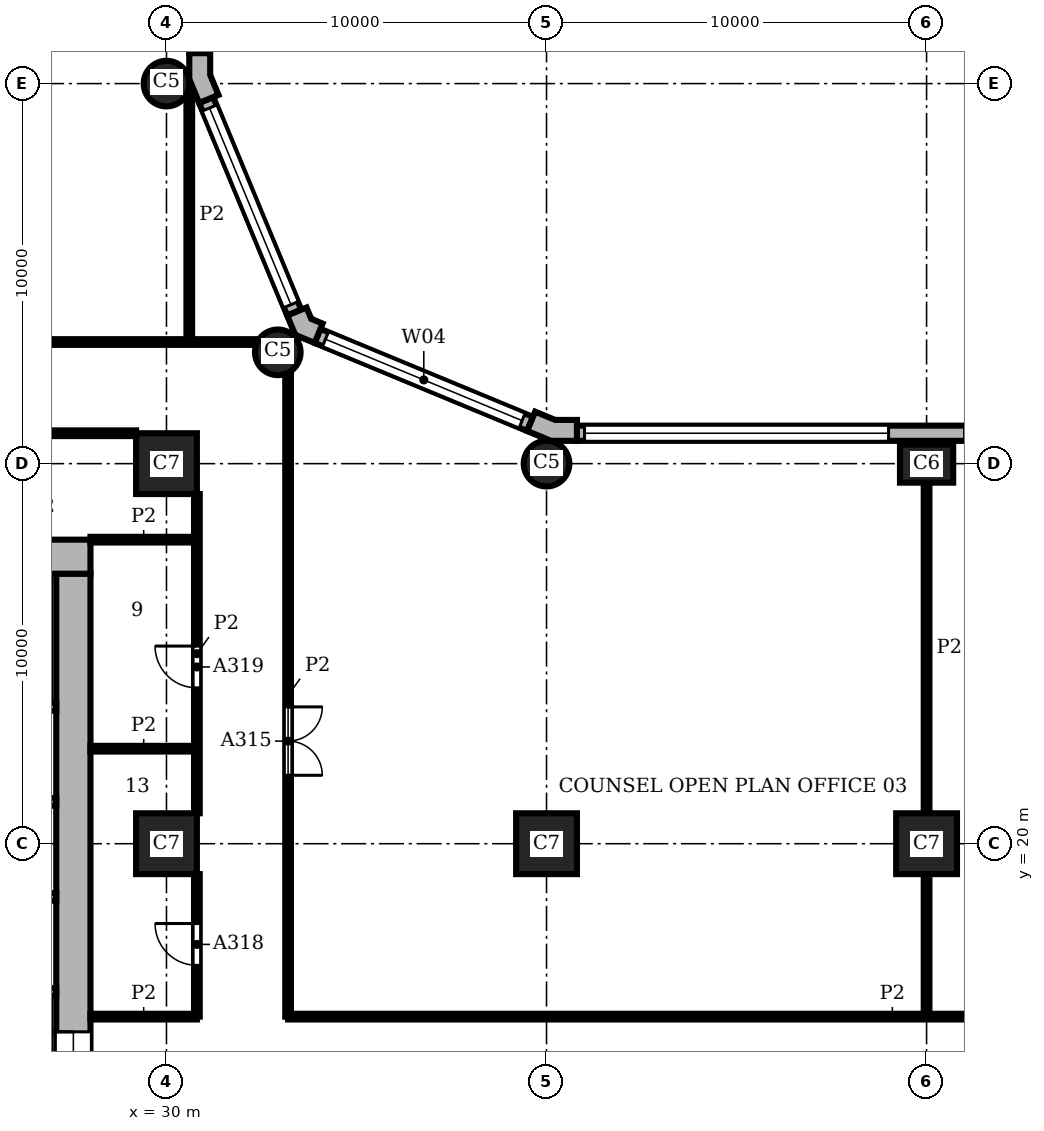
"""IFC4 building model, lengths in metres.
Left out: names, types, materials, properties, quantities, classifications, styles, units other than length and angle.
Written with IfcOpenShell. Run it as: python <this file> out.ifc"""

import sys

from ifc_helpers import new_model, si_unit, direction, frame, frame_2d, origin, origin_2d, place, context, subcontext, project, spatial, polyline, rectangle, circle, outline, extrude, element, fill, save


model = new_model("IFC4")
c1 = context("Model", 3, precision=1e-05, world=origin(), true_north=direction((0.0, 1.0)))
c2 = subcontext(c1, "Body", "Model", "MODEL_VIEW")
j1 = project(units=[si_unit("LENGTHUNIT", "METRE"), si_unit("PLANEANGLEUNIT", "RADIAN")], contexts=[c1])
p1 = place(None, origin())
s1 = spatial("IfcSite", under=j1, at=p1, CompositionType="ELEMENT")
p2 = place(p1, origin())
s2 = spatial("IfcBuilding", under=s1, at=p2, CompositionType="ELEMENT")
p3 = place(p2, frame((0.0, 0.0, 43.2)))
s3 = spatial("IfcBuildingStorey", under=s2, at=p3, CompositionType="ELEMENT", Elevation=43.2)
p4 = place(p3, frame((50.0, 30.0, 0.0), z_axis=(0.0, 0.0, 1.0), x_axis=(1.0, 0.0, 0.0)))
e1 = element("IfcColumn", 1, at=p4, inside=s3, PredefinedType="COLUMN", context=c2, shape_type="SweptSolid", body=[
    extrude(rectangle(XDim=1.4, YDim=1.0, at=origin_2d()), origin(), (0.0, 0.0, 1.0), 3.9),
])
for number, where, z_axis, x_axis in (
    (2, (40.0, 30.0, 0.0), (0.0, 0.0, 1.0), (1.0, 0.0, 0.0)),
    (3, (32.929, 32.929, 0.0), (0.0, 0.0, 1.0), (1.0, 0.0, 0.0)),
    (4, (30.0, 40.0, 0.0), (0.0, 0.0, 1.0), (1.0, 0.0, 0.0)),
):
    element("IfcColumn", number, at=place(p3, frame(where, z_axis=z_axis, x_axis=x_axis)), inside=s3, PredefinedType="COLUMN", context=c2, shape_type="SweptSolid", body=[
        extrude(circle(Radius=0.6, at=origin_2d()), origin(), (0.0, 0.0, 1.0), 3.9),
    ])
for number, where, z_axis, x_axis in (
    (5, (30.0, 20.0, 0.0), (0.0, 0.0, 1.0), (1.0, 0.0, 0.0)),
    (6, (30.0, 30.0, 0.0), (0.0, 0.0, 1.0), (1.0, 0.0, 0.0)),
    (7, (40.0, 20.0, 0.0), (0.0, 0.0, 1.0), (1.0, 0.0, 0.0)),
    (8, (50.0, 20.0, 0.0), (0.0, 0.0, 1.0), (1.0, 0.0, 0.0)),
):
    element("IfcColumn", number, at=place(p3, frame(where, z_axis=z_axis, x_axis=x_axis)), inside=s3, PredefinedType="COLUMN", context=c2, shape_type="SweptSolid", body=[
        extrude(rectangle(XDim=1.6, YDim=1.6, at=origin_2d()), origin(), (0.0, 0.0, 1.0), 3.9),
    ])
p5 = place(p3, frame((27.55, 8.9, 0.0), z_axis=(0.0, 0.0, 1.0), x_axis=(0.0, 1.0, 0.0)))
e9 = element("IfcWall", 9, at=p5, inside=s3, PredefinedType="SHEAR", context=c2, shape_type="SweptSolid", body=[
    extrude(rectangle(XDim=18.2, YDim=0.9, at=frame_2d((9.1, 0.0))), origin(), (0.0, 0.0, 1.0), 3.9),
])
p6 = place(p5, frame((4.55, 0.0, 0.0)))
e10 = element("IfcOpeningElement", 10, at=p6, cuts=e9, PredefinedType="OPENING", context=c2, shape_type="SweptSolid", body=[
    extrude(rectangle(XDim=1.6, YDim=2.1, at=frame_2d((0.8, 1.05))), frame((0.0, 0.46, 0.0), z_axis=(0.0, -1.0, 0.0), x_axis=(1.0, 0.0, 0.0)), (0.0, 0.0, 1.0), 0.92),
])
p7 = place(p3, frame((28.0, 27.55, 0.0), z_axis=(0.0, 0.0, 1.0), x_axis=(-1.0, 0.0, 0.0)))
e11 = element("IfcWall", 11, at=p7, inside=s3, PredefinedType="SHEAR", context=c2, shape_type="SweptSolid", body=[
    extrude(rectangle(XDim=20.0, YDim=0.9, at=frame_2d((10.0, 0.0))), origin(), (0.0, 0.0, 1.0), 3.9),
])
p8 = place(p3, origin())
e12 = element("IfcWall", 12, at=p8, inside=s3, PredefinedType="SOLIDWALL", context=c2, shape_type="SweptSolid", body=[
    extrude(outline(polyline([(40.8, 31.0), (40.8, 31.15), (40.229, 31.15), (39.701, 31.369), (39.644, 31.23), (39.49, 30.861), (40.119, 30.6), (40.8, 30.6), (40.8, 31.0)])), origin(), (0.0, 0.0, 1.0), 3.9),
])
e13 = element("IfcWall", 13, at=p8, inside=s3, PredefinedType="SOLIDWALL", context=c2, shape_type="SweptSolid", body=[
    extrude(outline(polyline([(34.051, 33.547), (34.108, 33.685), (33.809, 33.809), (33.685, 34.108), (33.547, 34.051), (33.177, 33.898), (33.388, 33.388), (33.898, 33.177), (34.051, 33.547)])), origin(), (0.0, 0.0, 1.0), 3.9),
])
e14 = element("IfcWall", 14, at=p8, inside=s3, PredefinedType="SOLIDWALL", context=c2, shape_type="SweptSolid", body=[
    extrude(outline(polyline([(31.23, 39.644), (31.369, 39.701), (31.15, 40.229), (31.15, 40.8), (31.0, 40.8), (30.6, 40.8), (30.6, 40.119), (30.861, 39.49), (31.23, 39.644)])), origin(), (0.0, 0.0, 1.0), 3.9),
])
p9 = place(p3, frame((69.2, 30.8, 0.0), z_axis=(0.0, 0.0, 1.0), x_axis=(-1.0, 0.0, 0.0)))
e15 = element("IfcWall", 15, at=p9, inside=s3, PredefinedType="SOLIDWALL", context=c2, shape_type="SweptSolid", body=[
    extrude(rectangle(XDim=28.4, YDim=0.4, at=frame_2d((14.2, 0.0))), origin(), (0.0, 0.0, 1.0), 3.9),
])
p10 = place(p9, frame((0.2, 0.0, 0.9)))
e16 = element("IfcOpeningElement", 16, at=p10, cuts=e15, PredefinedType="OPENING", context=c2, shape_type="SweptSolid", body=[
    extrude(rectangle(XDim=8.0, YDim=2.35, at=frame_2d((4.0, 1.175))), frame((0.0, 0.21, 0.0), z_axis=(0.0, -1.0, 0.0), x_axis=(1.0, 0.0, 0.0)), (0.0, 0.0, 1.0), 0.42),
])
p11 = place(p9, frame((10.2, 0.0, 0.9)))
e17 = element("IfcOpeningElement", 17, at=p11, cuts=e15, PredefinedType="OPENING", context=c2, shape_type="SweptSolid", body=[
    extrude(rectangle(XDim=8.0, YDim=2.35, at=frame_2d((4.0, 1.175))), frame((0.0, 0.21, 0.0), z_axis=(0.0, -1.0, 0.0), x_axis=(1.0, 0.0, 0.0)), (0.0, 0.0, 1.0), 0.42),
])
p12 = place(p9, frame((20.2, 0.0, 0.9)))
e18 = element("IfcOpeningElement", 18, at=p12, cuts=e15, PredefinedType="OPENING", context=c2, shape_type="SweptSolid", body=[
    extrude(rectangle(XDim=8.0, YDim=2.35, at=frame_2d((4.0, 1.175))), frame((0.0, 0.21, 0.0), z_axis=(0.0, -1.0, 0.0), x_axis=(1.0, 0.0, 0.0)), (0.0, 0.0, 1.0), 0.42),
])
p13 = place(p3, frame((39.567, 31.045, 0.0), z_axis=(0.0, 0.0, 1.0), x_axis=(-0.923891000409, 0.382655745237, 0.0)))
e19 = element("IfcWall", 19, at=p13, inside=s3, PredefinedType="SOLIDWALL", context=c2, shape_type="SweptSolid", body=[
    extrude(rectangle(XDim=6.053, YDim=0.4, at=frame_2d((3.027, 0.0))), origin(), (0.0, 0.0, 1.0), 3.9),
])
p14 = place(p13, frame((0.227, 0.0, 0.9)))
e20 = element("IfcOpeningElement", 20, at=p14, cuts=e19, PredefinedType="OPENING", context=c2, shape_type="SweptSolid", body=[
    extrude(rectangle(XDim=5.6, YDim=2.35, at=frame_2d((2.8, 1.175))), frame((0.0, 0.21, 0.0), z_axis=(0.0, -1.0, 0.0), x_axis=(1.0, 0.0, 0.0)), (0.0, 0.0, 1.0), 0.42),
])
p15 = place(p3, frame((33.362, 33.974, 0.0), z_axis=(0.0, 0.0, 1.0), x_axis=(-0.382655745237, 0.923891000409, 0.0)))
e21 = element("IfcWall", 21, at=p15, inside=s3, PredefinedType="SOLIDWALL", context=c2, shape_type="SweptSolid", body=[
    extrude(rectangle(XDim=6.053, YDim=0.4, at=frame_2d((3.027, 0.0))), origin(), (0.0, 0.0, 1.0), 3.9),
])
p16 = place(p15, frame((0.227, 0.0, 0.9)))
e22 = element("IfcOpeningElement", 22, at=p16, cuts=e21, PredefinedType="OPENING", context=c2, shape_type="SweptSolid", body=[
    extrude(rectangle(XDim=5.6, YDim=2.35, at=frame_2d((2.8, 1.175))), frame((0.0, 0.21, 0.0), z_axis=(0.0, -1.0, 0.0), x_axis=(1.0, 0.0, 0.0)), (0.0, 0.0, 1.0), 0.42),
])
p17 = place(p3, frame((30.8, 40.8, 0.0), z_axis=(0.0, 0.0, 1.0), x_axis=(0.0, 1.0, 0.0)))
e23 = element("IfcWall", 23, at=p17, inside=s3, PredefinedType="SOLIDWALL", context=c2, shape_type="SweptSolid", body=[
    extrude(rectangle(XDim=18.4, YDim=0.4, at=frame_2d((9.2, 0.0))), origin(), (0.0, 0.0, 1.0), 3.9),
])
p18 = place(p17, frame((0.2, 0.0, 0.9)))
e24 = element("IfcOpeningElement", 24, at=p18, cuts=e23, PredefinedType="OPENING", context=c2, shape_type="SweptSolid", body=[
    extrude(rectangle(XDim=8.0, YDim=2.35, at=frame_2d((4.0, 1.175))), frame((0.0, 0.21, 0.0), z_axis=(0.0, -1.0, 0.0), x_axis=(1.0, 0.0, 0.0)), (0.0, 0.0, 1.0), 0.42),
])
p19 = place(p17, frame((10.2, 0.0, 0.9)))
e25 = element("IfcOpeningElement", 25, at=p19, cuts=e23, PredefinedType="OPENING", context=c2, shape_type="SweptSolid", body=[
    extrude(rectangle(XDim=8.0, YDim=2.35, at=frame_2d((4.0, 1.175))), frame((0.0, 0.21, 0.0), z_axis=(0.0, -1.0, 0.0), x_axis=(1.0, 0.0, 0.0)), (0.0, 0.0, 1.0), 0.42),
])
for number, where, z_axis, x_axis in (
    (26, (24.3, 16.1, 0.0), (0.0, 0.0, 1.0), (1.0, 0.0, 0.0)),
    (27, (24.3, 18.6, 0.0), (0.0, 0.0, 1.0), (1.0, 0.0, 0.0)),
    (28, (24.3, 21.1, 0.0), (0.0, 0.0, 1.0), (1.0, 0.0, 0.0)),
):
    element("IfcWall", number, at=place(p3, frame(where, z_axis=z_axis, x_axis=x_axis)), inside=s3, PredefinedType="SHEAR", context=c2, shape_type="SweptSolid", body=[
        extrude(rectangle(XDim=2.8, YDim=0.2, at=frame_2d((1.4, 0.0))), origin(), (0.0, 0.0, 1.0), 3.58),
    ])
p20 = place(p3, frame((13.8, 23.6, 0.0), z_axis=(0.0, 0.0, 1.0), x_axis=(1.0, 0.0, 0.0)))
e29 = element("IfcWall", 29, at=p20, inside=s3, PredefinedType="SHEAR", context=c2, shape_type="SweptSolid", body=[
    extrude(rectangle(XDim=13.3, YDim=0.2, at=frame_2d((6.65, 0.0))), origin(), (0.0, 0.0, 1.0), 3.58),
])
p21 = place(p20, frame((2.4, 0.0, 0.0)))
e30 = element("IfcOpeningElement", 30, at=p21, cuts=e29, PredefinedType="OPENING", context=c2, shape_type="SweptSolid", body=[
    extrude(rectangle(XDim=1.1, YDim=2.1, at=frame_2d((0.55, 1.05))), frame((0.0, 0.11, 0.0), z_axis=(0.0, -1.0, 0.0), x_axis=(1.0, 0.0, 0.0)), (0.0, 0.0, 1.0), 0.22),
])
p22 = place(p20, frame((4.9, 0.0, 0.0)))
e31 = element("IfcOpeningElement", 31, at=p22, cuts=e29, PredefinedType="OPENING", context=c2, shape_type="SweptSolid", body=[
    extrude(rectangle(XDim=1.1, YDim=2.1, at=frame_2d((0.55, 1.05))), frame((0.0, 0.11, 0.0), z_axis=(0.0, -1.0, 0.0), x_axis=(1.0, 0.0, 0.0)), (0.0, 0.0, 1.0), 0.22),
])
p23 = place(p20, frame((0.25, 0.0, 0.0)))
e32 = element("IfcOpeningElement", 32, at=p23, cuts=e29, PredefinedType="OPENING", context=c2, shape_type="SweptSolid", body=[
    extrude(rectangle(XDim=1.0, YDim=2.1, at=frame_2d((0.5, 1.05))), frame((0.0, 0.11, 0.0), z_axis=(0.0, -1.0, 0.0), x_axis=(1.0, 0.0, 0.0)), (0.0, 0.0, 1.0), 0.22),
])
p24 = place(p3, frame((30.6, 33.2, 0.0), z_axis=(0.0, 0.0, 1.0), x_axis=(0.0, 1.0, 0.0)))
e33 = element("IfcWall", 33, at=p24, inside=s3, PredefinedType="PARTITIONING", context=c2, shape_type="SweptSolid", body=[
    extrude(rectangle(XDim=6.699, YDim=0.15, at=frame_2d((3.35, 0.0))), origin(), (0.0, 0.0, 1.0), 3.58),
])
p25 = place(p3, frame((30.8, 15.45, 0.0), z_axis=(0.0, 0.0, 1.0), x_axis=(0.0, 1.0, 0.0)))
e34 = element("IfcWall", 34, at=p25, inside=s3, PredefinedType="PARTITIONING", context=c2, shape_type="SweptSolid", body=[
    extrude(rectangle(XDim=3.75, YDim=0.15, at=frame_2d((1.875, 0.0))), origin(), (0.0, 0.0, 1.0), 3.58),
])
p26 = place(p25, frame((1.35, 0.0, 0.0)))
e35 = element("IfcOpeningElement", 35, at=p26, cuts=e34, PredefinedType="OPENING", context=c2, shape_type="SweptSolid", body=[
    extrude(rectangle(XDim=1.1, YDim=2.1, at=frame_2d((0.55, 1.05))), frame((0.0, 0.085, 0.0), z_axis=(0.0, -1.0, 0.0), x_axis=(1.0, 0.0, 0.0)), (0.0, 0.0, 1.0), 0.17),
])
p27 = place(p3, frame((30.8, 20.8, 0.0), z_axis=(0.0, 0.0, 1.0), x_axis=(0.0, 1.0, 0.0)))
e36 = element("IfcWall", 36, at=p27, inside=s3, PredefinedType="PARTITIONING", context=c2, shape_type="SweptSolid", body=[
    extrude(rectangle(XDim=8.4, YDim=0.15, at=frame_2d((4.2, 0.0))), origin(), (0.0, 0.0, 1.0), 3.58),
])
p28 = place(p27, frame((3.3, 0.0, 0.0)))
e37 = element("IfcOpeningElement", 37, at=p28, cuts=e36, PredefinedType="OPENING", context=c2, shape_type="SweptSolid", body=[
    extrude(rectangle(XDim=1.1, YDim=2.1, at=frame_2d((0.55, 1.05))), frame((0.0, 0.085, 0.0), z_axis=(0.0, -1.0, 0.0), x_axis=(1.0, 0.0, 0.0)), (0.0, 0.0, 1.0), 0.17),
])
p29 = place(p3, frame((33.2, 15.45, 0.0), z_axis=(0.0, 0.0, 1.0), x_axis=(0.0, 1.0, 0.0)))
e38 = element("IfcWall", 38, at=p29, inside=s3, PredefinedType="PARTITIONING", context=c2, shape_type="SweptSolid", body=[
    extrude(rectangle(XDim=16.912, YDim=0.15, at=frame_2d((8.456, 0.0))), origin(), (0.0, 0.0, 1.0), 3.58),
])
p30 = place(p29, frame((6.35, 0.0, 0.0)))
e39 = element("IfcOpeningElement", 39, at=p30, cuts=e38, PredefinedType="OPENING", context=c2, shape_type="SweptSolid", body=[
    extrude(rectangle(XDim=1.8, YDim=2.1, at=frame_2d((0.9, 1.05))), frame((0.0, 0.085, 0.0), z_axis=(0.0, -1.0, 0.0), x_axis=(1.0, 0.0, 0.0)), (0.0, 0.0, 1.0), 0.17),
])
p31 = place(p3, frame((50.0, 15.45, 0.0), z_axis=(0.0, 0.0, 1.0), x_axis=(0.0, 1.0, 0.0)))
e40 = element("IfcWall", 40, at=p31, inside=s3, PredefinedType="PARTITIONING", context=c2, shape_type="SweptSolid", body=[
    extrude(rectangle(XDim=3.75, YDim=0.15, at=frame_2d((1.875, 0.0))), origin(), (0.0, 0.0, 1.0), 3.58),
])
p32 = place(p3, frame((50.0, 20.8, 0.0), z_axis=(0.0, 0.0, 1.0), x_axis=(0.0, 1.0, 0.0)))
e41 = element("IfcWall", 41, at=p32, inside=s3, PredefinedType="PARTITIONING", context=c2, shape_type="SweptSolid", body=[
    extrude(rectangle(XDim=8.7, YDim=0.15, at=frame_2d((4.35, 0.0))), origin(), (0.0, 0.0, 1.0), 3.58),
])
p33 = place(p3, frame((28.0, 15.45, 0.0), z_axis=(0.0, 0.0, 1.0), x_axis=(1.0, 0.0, 0.0)))
e42 = element("IfcWall", 42, at=p33, inside=s3, PredefinedType="PARTITIONING", context=c2, shape_type="SweptSolid", body=[
    extrude(rectangle(XDim=2.8, YDim=0.15, at=frame_2d((1.4, 0.0))), origin(), (0.0, 0.0, 1.0), 3.58),
])
p34 = place(p3, frame((33.2, 15.45, 0.0), z_axis=(0.0, 0.0, 1.0), x_axis=(1.0, 0.0, 0.0)))
e43 = element("IfcWall", 43, at=p34, inside=s3, PredefinedType="PARTITIONING", context=c2, shape_type="SweptSolid", body=[
    extrude(rectangle(XDim=31.8, YDim=0.15, at=frame_2d((15.9, 0.0))), origin(), (0.0, 0.0, 1.0), 3.58),
])
p35 = place(p34, frame((20.4, 0.0, 0.0)))
e44 = element("IfcOpeningElement", 44, at=p35, cuts=e43, PredefinedType="OPENING", context=c2, shape_type="SweptSolid", body=[
    extrude(rectangle(XDim=1.8, YDim=2.1, at=frame_2d((0.9, 1.05))), frame((0.0, 0.085, 0.0), z_axis=(0.0, -1.0, 0.0), x_axis=(1.0, 0.0, 0.0)), (0.0, 0.0, 1.0), 0.17),
])
for number, where, z_axis, x_axis in (
    (45, (28.0, 22.5, 0.0), (0.0, 0.0, 1.0), (1.0, 0.0, 0.0)),
    (46, (28.0, 28.0, 0.0), (0.0, 0.0, 1.0), (1.0, 0.0, 0.0)),
):
    element("IfcWall", number, at=place(p3, frame(where, z_axis=z_axis, x_axis=x_axis)), inside=s3, PredefinedType="PARTITIONING", context=c2, shape_type="SweptSolid", body=[
        extrude(rectangle(XDim=2.8, YDim=0.15, at=frame_2d((1.4, 0.0))), origin(), (0.0, 0.0, 1.0), 3.58),
    ])
p36 = place(p3, frame((22.5, 30.8, 0.0), z_axis=(0.0, 0.0, 1.0), x_axis=(1.0, 0.0, 0.0)))
e47 = element("IfcWall", 47, at=p36, inside=s3, PredefinedType="PARTITIONING", context=c2, shape_type="SweptSolid", body=[
    extrude(rectangle(XDim=6.7, YDim=0.15, at=frame_2d((3.35, 0.0))), origin(), (0.0, 0.0, 1.0), 3.58),
])
p37 = place(p36, frame((3.35, 0.0, 0.0)))
e48 = element("IfcOpeningElement", 48, at=p37, cuts=e47, PredefinedType="OPENING", context=c2, shape_type="SweptSolid", body=[
    extrude(rectangle(XDim=0.8, YDim=2.1, at=frame_2d((0.4, 1.05))), frame((0.0, 0.085, 0.0), z_axis=(0.0, -1.0, 0.0), x_axis=(1.0, 0.0, 0.0)), (0.0, 0.0, 1.0), 0.17),
])
p38 = place(p3, frame((16.5, 33.2, 0.0), z_axis=(0.0, 0.0, 1.0), x_axis=(1.0, 0.0, 0.0)))
e49 = element("IfcWall", 49, at=p38, inside=s3, PredefinedType="PARTITIONING", context=c2, shape_type="SweptSolid", body=[
    extrude(rectangle(XDim=15.862, YDim=0.15, at=frame_2d((7.931, 0.0))), origin(), (0.0, 0.0, 1.0), 3.58),
])
p39 = place(p38, frame((6.85, 0.0, 0.0)))
e50 = element("IfcOpeningElement", 50, at=p39, cuts=e49, PredefinedType="OPENING", context=c2, shape_type="SweptSolid", body=[
    extrude(rectangle(XDim=1.8, YDim=2.1, at=frame_2d((0.9, 1.05))), frame((0.0, 0.085, 0.0), z_axis=(0.0, -1.0, 0.0), x_axis=(1.0, 0.0, 0.0)), (0.0, 0.0, 1.0), 0.17),
])
p40 = place(p12, origin())
e51 = element("IfcWindow", 51, at=p40, inside=s3, PartitioningType="SINGLE_PANEL", PredefinedType="WINDOW", context=c2, shape_type="SweptSolid", body=[
    extrude(rectangle(XDim=8.0, YDim=2.35, at=frame_2d((4.0, 1.175))), frame((0.0, 0.16, 0.0), z_axis=(0.0, -1.0, 0.0), x_axis=(1.0, 0.0, 0.0)), (0.0, 0.0, 1.0), 0.06),
])
fill(e18, e51)
p41 = place(p14, origin())
e52 = element("IfcWindow", 52, at=p41, inside=s3, PartitioningType="SINGLE_PANEL", PredefinedType="WINDOW", context=c2, shape_type="SweptSolid", body=[
    extrude(rectangle(XDim=5.6, YDim=2.35, at=frame_2d((2.8, 1.175))), frame((0.0, 0.16, 0.0), z_axis=(0.0, -1.0, 0.0), x_axis=(1.0, 0.0, 0.0)), (0.0, 0.0, 1.0), 0.06),
])
fill(e20, e52)
p42 = place(p16, origin())
e53 = element("IfcWindow", 53, at=p42, inside=s3, PartitioningType="SINGLE_PANEL", PredefinedType="WINDOW", context=c2, shape_type="SweptSolid", body=[
    extrude(rectangle(XDim=5.6, YDim=2.35, at=frame_2d((2.8, 1.175))), frame((0.0, 0.16, 0.0), z_axis=(0.0, -1.0, 0.0), x_axis=(1.0, 0.0, 0.0)), (0.0, 0.0, 1.0), 0.06),
])
fill(e22, e53)
p43 = place(p6, origin())
e54 = element("IfcDoor", 54, at=p43, inside=s3, OperationType="DOUBLE_DOOR_SINGLE_SWING", PredefinedType="DOOR", context=c2, shape_type="SweptSolid", body=[
    extrude(rectangle(XDim=1.6, YDim=2.1, at=frame_2d((0.8, 1.05))), frame((0.0, 0.025, 0.0), z_axis=(0.0, -1.0, 0.0), x_axis=(1.0, 0.0, 0.0)), (0.0, 0.0, 1.0), 0.05),
])
fill(e10, e54)
p44 = place(p30, frame((1.8, 0.0, 0.0), z_axis=(0.0, 0.0, 1.0), x_axis=(-1.0, 0.0, 0.0)))
e55 = element("IfcDoor", 55, at=p44, inside=s3, OperationType="DOUBLE_DOOR_SINGLE_SWING", PredefinedType="DOOR", context=c2, shape_type="SweptSolid", body=[
    extrude(rectangle(XDim=1.8, YDim=2.1, at=frame_2d((0.9, 1.05))), frame((0.0, 0.025, 0.0), z_axis=(0.0, -1.0, 0.0), x_axis=(1.0, 0.0, 0.0)), (0.0, 0.0, 1.0), 0.05),
])
fill(e39, e55)
p45 = place(p26, origin())
e56 = element("IfcDoor", 56, at=p45, inside=s3, OperationType="SINGLE_SWING_RIGHT", PredefinedType="DOOR", context=c2, shape_type="SweptSolid", body=[
    extrude(rectangle(XDim=1.1, YDim=2.1, at=frame_2d((0.55, 1.05))), frame((0.0, 0.025, 0.0), z_axis=(0.0, -1.0, 0.0), x_axis=(1.0, 0.0, 0.0)), (0.0, 0.0, 1.0), 0.05),
])
fill(e35, e56)
p46 = place(p28, origin())
e57 = element("IfcDoor", 57, at=p46, inside=s3, OperationType="SINGLE_SWING_RIGHT", PredefinedType="DOOR", context=c2, shape_type="SweptSolid", body=[
    extrude(rectangle(XDim=1.1, YDim=2.1, at=frame_2d((0.55, 1.05))), frame((0.0, 0.025, 0.0), z_axis=(0.0, -1.0, 0.0), x_axis=(1.0, 0.0, 0.0)), (0.0, 0.0, 1.0), 0.05),
])
fill(e37, e57)
save(model, sys.argv[1])
